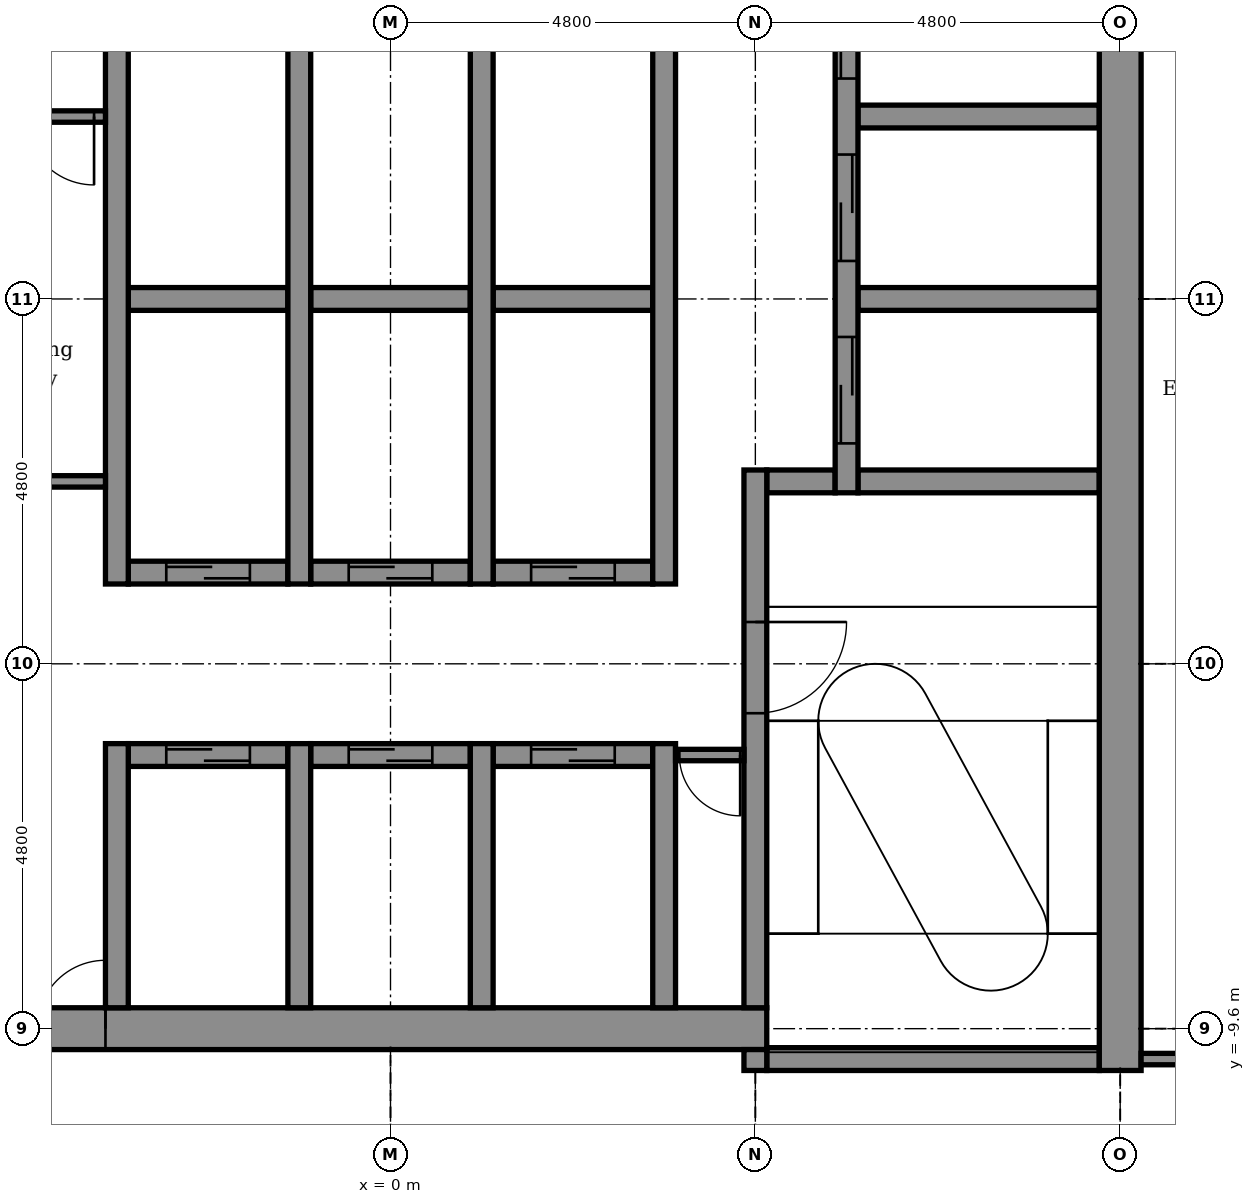
"""IFC4 building model, lengths in metres.
Left out: names, types, materials, properties, quantities, classifications, styles, units other than length and angle.
Written with IfcOpenShell. Run it as: python <this file> out.ifc"""

import sys

from ifc_helpers import new_model, si_unit, direction, frame, frame_2d, origin, place, context, subcontext, project, spatial, rectangle, extrude, element, fill, save


model = new_model("IFC4")
c1 = context("Model", 3, precision=1e-05, world=origin(), true_north=direction((0.0, 1.0)))
c2 = subcontext(c1, "Body", "Model", "MODEL_VIEW")
j1 = project(units=[si_unit("LENGTHUNIT", "METRE"), si_unit("PLANEANGLEUNIT", "RADIAN")], contexts=[c1])
p1 = place(None, origin())
s1 = spatial("IfcSite", under=j1, at=p1, CompositionType="ELEMENT")
p2 = place(p1, origin())
s2 = spatial("IfcBuilding", under=s1, at=p2, CompositionType="ELEMENT")
p3 = place(p2, frame((0.0, 0.0, 257.9)))
s3 = spatial("IfcBuildingStorey", under=s2, at=p3, CompositionType="ELEMENT", Elevation=257.9)
p4 = place(p3, frame((4.95, -10.0, -0.15), z_axis=(0.0, 0.0, 1.0), x_axis=(1.0, 0.0, 0.0)))
e1 = element("IfcWall", 1, at=p4, inside=s3, PredefinedType="STANDARD", context=c2, shape_type="SweptSolid", body=[
    extrude(rectangle(XDim=4.375, YDim=0.3, at=frame_2d((2.188, 0.0))), origin(), (0.0, 0.0, 1.0), 3.9),
])
p5 = place(p3, frame((-5.25, -9.6, -0.15), z_axis=(0.0, 0.0, 1.0), x_axis=(1.0, 0.0, 0.0)))
e2 = element("IfcWall", 2, at=p5, inside=s3, PredefinedType="SHEAR", context=c2, shape_type="SweptSolid", body=[
    extrude(rectangle(XDim=10.2, YDim=0.55, at=frame_2d((5.1, 0.0))), origin(), (0.0, 0.0, 1.0), 3.9),
])
p6 = place(p5, frame((0.6, 0.0, 0.15)))
e3 = element("IfcOpeningElement", 3, at=p6, cuts=e2, PredefinedType="OPENING", context=c2, shape_type="SweptSolid", body=[
    extrude(rectangle(XDim=0.9, YDim=2.1, at=frame_2d((0.45, 1.05))), frame((0.0, 0.285, 0.0), z_axis=(0.0, -1.0, 0.0), x_axis=(1.0, 0.0, 0.0)), (0.0, 0.0, 1.0), 0.57),
])
p7 = place(p3, frame((-3.45, -6.0, -0.15), z_axis=(0.0, 0.0, 1.0), x_axis=(1.0, 0.0, 0.0)))
e4 = element("IfcWall", 4, at=p7, inside=s3, PredefinedType="STANDARD", context=c2, shape_type="SweptSolid", body=[
    extrude(rectangle(XDim=2.1, YDim=0.3, at=frame_2d((1.05, 0.0))), origin(), (0.0, 0.0, 1.0), 3.9),
])
p8 = place(p7, frame((0.5, 0.0, 0.15)))
e5 = element("IfcOpeningElement", 5, at=p8, cuts=e4, PredefinedType="OPENING", context=c2, shape_type="SweptSolid", body=[
    extrude(rectangle(XDim=1.1, YDim=2.1, at=frame_2d((0.55, 1.05))), frame((0.0, 0.16, 0.0), z_axis=(0.0, -1.0, 0.0), x_axis=(1.0, 0.0, 0.0)), (0.0, 0.0, 1.0), 0.32),
])
p9 = place(p3, frame((-1.05, -6.0, -0.15), z_axis=(0.0, 0.0, 1.0), x_axis=(1.0, 0.0, 0.0)))
e6 = element("IfcWall", 6, at=p9, inside=s3, PredefinedType="STANDARD", context=c2, shape_type="SweptSolid", body=[
    extrude(rectangle(XDim=2.1, YDim=0.3, at=frame_2d((1.05, 0.0))), origin(), (0.0, 0.0, 1.0), 3.9),
])
p10 = place(p9, frame((0.5, 0.0, 0.15)))
e7 = element("IfcOpeningElement", 7, at=p10, cuts=e6, PredefinedType="OPENING", context=c2, shape_type="SweptSolid", body=[
    extrude(rectangle(XDim=1.1, YDim=2.1, at=frame_2d((0.55, 1.05))), frame((0.0, 0.16, 0.0), z_axis=(0.0, -1.0, 0.0), x_axis=(1.0, 0.0, 0.0)), (0.0, 0.0, 1.0), 0.32),
])
p11 = place(p3, frame((1.35, -6.0, -0.15), z_axis=(0.0, 0.0, 1.0), x_axis=(1.0, 0.0, 0.0)))
e8 = element("IfcWall", 8, at=p11, inside=s3, PredefinedType="STANDARD", context=c2, shape_type="SweptSolid", body=[
    extrude(rectangle(XDim=2.1, YDim=0.3, at=frame_2d((1.05, 0.0))), origin(), (0.0, 0.0, 1.0), 3.9),
])
p12 = place(p11, frame((0.5, 0.0, 0.15)))
e9 = element("IfcOpeningElement", 9, at=p12, cuts=e8, PredefinedType="OPENING", context=c2, shape_type="SweptSolid", body=[
    extrude(rectangle(XDim=1.1, YDim=2.1, at=frame_2d((0.55, 1.05))), frame((0.0, 0.16, 0.0), z_axis=(0.0, -1.0, 0.0), x_axis=(1.0, 0.0, 0.0)), (0.0, 0.0, 1.0), 0.32),
])
p13 = place(p3, frame((-3.45, -3.6, -0.15), z_axis=(0.0, 0.0, 1.0), x_axis=(1.0, 0.0, 0.0)))
e10 = element("IfcWall", 10, at=p13, inside=s3, PredefinedType="STANDARD", context=c2, shape_type="SweptSolid", body=[
    extrude(rectangle(XDim=2.1, YDim=0.3, at=frame_2d((1.05, 0.0))), origin(), (0.0, 0.0, 1.0), 3.9),
])
p14 = place(p13, frame((0.5, 0.0, 0.15)))
e11 = element("IfcOpeningElement", 11, at=p14, cuts=e10, PredefinedType="OPENING", context=c2, shape_type="SweptSolid", body=[
    extrude(rectangle(XDim=1.1, YDim=2.1, at=frame_2d((0.55, 1.05))), frame((0.0, 0.16, 0.0), z_axis=(0.0, -1.0, 0.0), x_axis=(1.0, 0.0, 0.0)), (0.0, 0.0, 1.0), 0.32),
])
p15 = place(p3, frame((-1.05, -3.6, -0.15), z_axis=(0.0, 0.0, 1.0), x_axis=(1.0, 0.0, 0.0)))
e12 = element("IfcWall", 12, at=p15, inside=s3, PredefinedType="STANDARD", context=c2, shape_type="SweptSolid", body=[
    extrude(rectangle(XDim=2.1, YDim=0.3, at=frame_2d((1.05, 0.0))), origin(), (0.0, 0.0, 1.0), 3.9),
])
p16 = place(p15, frame((0.5, 0.0, 0.15)))
e13 = element("IfcOpeningElement", 13, at=p16, cuts=e12, PredefinedType="OPENING", context=c2, shape_type="SweptSolid", body=[
    extrude(rectangle(XDim=1.1, YDim=2.1, at=frame_2d((0.55, 1.05))), frame((0.0, 0.16, 0.0), z_axis=(0.0, -1.0, 0.0), x_axis=(1.0, 0.0, 0.0)), (0.0, 0.0, 1.0), 0.32),
])
p17 = place(p3, frame((1.35, -3.6, -0.15), z_axis=(0.0, 0.0, 1.0), x_axis=(1.0, 0.0, 0.0)))
e14 = element("IfcWall", 14, at=p17, inside=s3, PredefinedType="STANDARD", context=c2, shape_type="SweptSolid", body=[
    extrude(rectangle(XDim=2.1, YDim=0.3, at=frame_2d((1.05, 0.0))), origin(), (0.0, 0.0, 1.0), 3.9),
])
p18 = place(p17, frame((0.5, 0.0, 0.15)))
e15 = element("IfcOpeningElement", 15, at=p18, cuts=e14, PredefinedType="OPENING", context=c2, shape_type="SweptSolid", body=[
    extrude(rectangle(XDim=1.1, YDim=2.1, at=frame_2d((0.55, 1.05))), frame((0.0, 0.16, 0.0), z_axis=(0.0, -1.0, 0.0), x_axis=(1.0, 0.0, 0.0)), (0.0, 0.0, 1.0), 0.32),
])
p19 = place(p3, frame((4.95, -2.4, -0.15), z_axis=(0.0, 0.0, 1.0), x_axis=(1.0, 0.0, 0.0)))
e16 = element("IfcWall", 16, at=p19, inside=s3, PredefinedType="STANDARD", context=c2, shape_type="SweptSolid", body=[
    extrude(rectangle(XDim=0.9, YDim=0.3, at=frame_2d((0.45, 0.0))), origin(), (0.0, 0.0, 1.0), 3.9),
])
p20 = place(p3, frame((6.15, -2.4, -0.15), z_axis=(0.0, 0.0, 1.0), x_axis=(1.0, 0.0, 0.0)))
e17 = element("IfcWall", 17, at=p20, inside=s3, PredefinedType="STANDARD", context=c2, shape_type="SweptSolid", body=[
    extrude(rectangle(XDim=3.175, YDim=0.3, at=frame_2d((1.587, 0.0))), origin(), (0.0, 0.0, 1.0), 3.9),
])
p21 = place(p3, frame((-3.45, 0.0, -0.15), z_axis=(0.0, 0.0, 1.0), x_axis=(1.0, 0.0, 0.0)))
e18 = element("IfcWall", 18, at=p21, inside=s3, PredefinedType="STANDARD", context=c2, shape_type="SweptSolid", body=[
    extrude(rectangle(XDim=2.1, YDim=0.3, at=frame_2d((1.05, 0.0))), origin(), (0.0, 0.0, 1.0), 3.9),
])
p22 = place(p3, frame((-1.05, 0.0, -0.15), z_axis=(0.0, 0.0, 1.0), x_axis=(1.0, 0.0, 0.0)))
e19 = element("IfcWall", 19, at=p22, inside=s3, PredefinedType="STANDARD", context=c2, shape_type="SweptSolid", body=[
    extrude(rectangle(XDim=2.1, YDim=0.3, at=frame_2d((1.05, 0.0))), origin(), (0.0, 0.0, 1.0), 3.9),
])
p23 = place(p3, frame((1.35, 0.0, -0.15), z_axis=(0.0, 0.0, 1.0), x_axis=(1.0, 0.0, 0.0)))
e20 = element("IfcWall", 20, at=p23, inside=s3, PredefinedType="STANDARD", context=c2, shape_type="SweptSolid", body=[
    extrude(rectangle(XDim=2.1, YDim=0.3, at=frame_2d((1.05, 0.0))), origin(), (0.0, 0.0, 1.0), 3.9),
])
for number, where, z_axis, x_axis in (
    (21, (6.15, 0.0, -0.15), (0.0, 0.0, 1.0), (1.0, 0.0, 0.0)),
    (22, (6.15, 2.4, -0.15), (0.0, 0.0, 1.0), (1.0, 0.0, 0.0)),
):
    element("IfcWall", number, at=place(p3, frame(where, z_axis=z_axis, x_axis=x_axis)), inside=s3, PredefinedType="STANDARD", context=c2, shape_type="SweptSolid", body=[
        extrude(rectangle(XDim=3.175, YDim=0.3, at=frame_2d((1.587, 0.0))), origin(), (0.0, 0.0, 1.0), 3.9),
    ])
p24 = place(p3, frame((-3.6, -9.325, -0.15), z_axis=(0.0, 0.0, 1.0), x_axis=(0.0, 1.0, 0.0)))
e23 = element("IfcWall", 23, at=p24, inside=s3, PredefinedType="STANDARD", context=c2, shape_type="SweptSolid", body=[
    extrude(rectangle(XDim=3.475, YDim=0.3, at=frame_2d((1.737, 0.0))), origin(), (0.0, 0.0, 1.0), 3.9),
])
p25 = place(p3, frame((-3.6, -3.75, -0.15), z_axis=(0.0, 0.0, 1.0), x_axis=(0.0, 1.0, 0.0)))
e24 = element("IfcWall", 24, at=p25, inside=s3, PredefinedType="STANDARD", context=c2, shape_type="SweptSolid", body=[
    extrude(rectangle(XDim=7.5, YDim=0.3, at=frame_2d((3.75, 0.0))), origin(), (0.0, 0.0, 1.0), 3.9),
])
p26 = place(p3, frame((-1.2, -9.325, -0.15), z_axis=(0.0, 0.0, 1.0), x_axis=(0.0, 1.0, 0.0)))
e25 = element("IfcWall", 25, at=p26, inside=s3, PredefinedType="STANDARD", context=c2, shape_type="SweptSolid", body=[
    extrude(rectangle(XDim=3.475, YDim=0.3, at=frame_2d((1.737, 0.0))), origin(), (0.0, 0.0, 1.0), 3.9),
])
p27 = place(p3, frame((-1.2, -3.75, -0.15), z_axis=(0.0, 0.0, 1.0), x_axis=(0.0, 1.0, 0.0)))
e26 = element("IfcWall", 26, at=p27, inside=s3, PredefinedType="STANDARD", context=c2, shape_type="SweptSolid", body=[
    extrude(rectangle(XDim=7.5, YDim=0.3, at=frame_2d((3.75, 0.0))), origin(), (0.0, 0.0, 1.0), 3.9),
])
p28 = place(p3, frame((1.2, -9.325, -0.15), z_axis=(0.0, 0.0, 1.0), x_axis=(0.0, 1.0, 0.0)))
e27 = element("IfcWall", 27, at=p28, inside=s3, PredefinedType="STANDARD", context=c2, shape_type="SweptSolid", body=[
    extrude(rectangle(XDim=3.475, YDim=0.3, at=frame_2d((1.737, 0.0))), origin(), (0.0, 0.0, 1.0), 3.9),
])
p29 = place(p3, frame((1.2, -3.75, -0.15), z_axis=(0.0, 0.0, 1.0), x_axis=(0.0, 1.0, 0.0)))
e28 = element("IfcWall", 28, at=p29, inside=s3, PredefinedType="STANDARD", context=c2, shape_type="SweptSolid", body=[
    extrude(rectangle(XDim=7.5, YDim=0.3, at=frame_2d((3.75, 0.0))), origin(), (0.0, 0.0, 1.0), 3.9),
])
p30 = place(p3, frame((3.6, -9.325, -0.15), z_axis=(0.0, 0.0, 1.0), x_axis=(0.0, 1.0, 0.0)))
e29 = element("IfcWall", 29, at=p30, inside=s3, PredefinedType="STANDARD", context=c2, shape_type="SweptSolid", body=[
    extrude(rectangle(XDim=3.475, YDim=0.3, at=frame_2d((1.737, 0.0))), origin(), (0.0, 0.0, 1.0), 3.9),
])
p31 = place(p3, frame((3.6, -3.75, -0.15), z_axis=(0.0, 0.0, 1.0), x_axis=(0.0, 1.0, 0.0)))
e30 = element("IfcWall", 30, at=p31, inside=s3, PredefinedType="STANDARD", context=c2, shape_type="SweptSolid", body=[
    extrude(rectangle(XDim=7.5, YDim=0.3, at=frame_2d((3.75, 0.0))), origin(), (0.0, 0.0, 1.0), 3.9),
])
p32 = place(p3, frame((4.8, -10.15, -0.15), z_axis=(0.0, 0.0, 1.0), x_axis=(0.0, 1.0, 0.0)))
e31 = element("IfcWall", 31, at=p32, inside=s3, PredefinedType="STANDARD", context=c2, shape_type="SweptSolid", body=[
    extrude(rectangle(XDim=0.275, YDim=0.3, at=frame_2d((0.137, 0.0))), origin(), (0.0, 0.0, 1.0), 3.9),
])
p33 = place(p3, frame((4.8, -9.325, -0.15), z_axis=(0.0, 0.0, 1.0), x_axis=(0.0, 1.0, 0.0)))
e32 = element("IfcWall", 32, at=p33, inside=s3, PredefinedType="STANDARD", context=c2, shape_type="SweptSolid", body=[
    extrude(rectangle(XDim=7.075, YDim=0.3, at=frame_2d((3.538, 0.0))), origin(), (0.0, 0.0, 1.0), 3.9),
])
p34 = place(p33, frame((3.875, 0.0, 0.15)))
e33 = element("IfcOpeningElement", 33, at=p34, cuts=e32, PredefinedType="OPENING", context=c2, shape_type="SweptSolid", body=[
    extrude(rectangle(XDim=1.2, YDim=2.1, at=frame_2d((0.6, 1.05))), frame((0.0, 0.16, 0.0), z_axis=(0.0, -1.0, 0.0), x_axis=(1.0, 0.0, 0.0)), (0.0, 0.0, 1.0), 0.32),
])
p35 = place(p3, frame((6.0, -2.55, -0.15), z_axis=(0.0, 0.0, 1.0), x_axis=(0.0, 1.0, 0.0)))
e34 = element("IfcWall", 34, at=p35, inside=s3, PredefinedType="STANDARD", context=c2, shape_type="SweptSolid", body=[
    extrude(rectangle(XDim=7.5, YDim=0.3, at=frame_2d((3.75, 0.0))), origin(), (0.0, 0.0, 1.0), 3.9),
])
p36 = place(p35, frame((0.65, 0.0, 0.15)))
e35 = element("IfcOpeningElement", 35, at=p36, cuts=e34, PredefinedType="OPENING", context=c2, shape_type="SweptSolid", body=[
    extrude(rectangle(XDim=1.4, YDim=2.1, at=frame_2d((0.7, 1.05))), frame((0.0, 0.16, 0.0), z_axis=(0.0, -1.0, 0.0), x_axis=(1.0, 0.0, 0.0)), (0.0, 0.0, 1.0), 0.32),
])
p37 = place(p35, frame((3.05, 0.0, 0.15)))
e36 = element("IfcOpeningElement", 36, at=p37, cuts=e34, PredefinedType="OPENING", context=c2, shape_type="SweptSolid", body=[
    extrude(rectangle(XDim=1.4, YDim=2.1, at=frame_2d((0.7, 1.05))), frame((0.0, 0.16, 0.0), z_axis=(0.0, -1.0, 0.0), x_axis=(1.0, 0.0, 0.0)), (0.0, 0.0, 1.0), 0.32),
])
p38 = place(p35, frame((5.45, 0.0, 0.15)))
e37 = element("IfcOpeningElement", 37, at=p38, cuts=e34, PredefinedType="OPENING", context=c2, shape_type="SweptSolid", body=[
    extrude(rectangle(XDim=1.4, YDim=2.1, at=frame_2d((0.7, 1.05))), frame((0.0, 0.16, 0.0), z_axis=(0.0, -1.0, 0.0), x_axis=(1.0, 0.0, 0.0)), (0.0, 0.0, 1.0), 0.32),
])
p39 = place(p3, frame((9.6, -10.15, -0.15), z_axis=(0.0, 0.0, 1.0), x_axis=(0.0, 1.0, 0.0)))
e38 = element("IfcWall", 38, at=p39, inside=s3, PredefinedType="SHEAR", context=c2, shape_type="SweptSolid", body=[
    extrude(rectangle(XDim=20.075, YDim=0.55, at=frame_2d((10.038, 0.0))), origin(), (0.0, 0.0, 1.0), 3.9),
])
p40 = place(p3, frame((9.875, -10.0, 0.0), z_axis=(0.0, 0.0, 1.0), x_axis=(1.0, 0.0, 0.0)))
e39 = element("IfcWall", 39, at=p40, inside=s3, PredefinedType="PARTITIONING", context=c2, shape_type="SweptSolid", body=[
    extrude(rectangle(XDim=4.68, YDim=0.15, at=frame_2d((2.34, 0.0))), origin(), (0.0, 0.0, 1.0), 3.75),
])
p41 = place(p3, frame((3.75, -6.0, 0.0), z_axis=(0.0, 0.0, 1.0), x_axis=(1.0, 0.0, 0.0)))
e40 = element("IfcWall", 40, at=p41, inside=s3, PredefinedType="PARTITIONING", context=c2, shape_type="SweptSolid", body=[
    extrude(rectangle(XDim=0.9, YDim=0.15, at=frame_2d((0.45, 0.0))), origin(), (0.0, 0.0, 1.0), 3.75),
])
p42 = place(p41, frame((0.05, 0.0, 0.0)))
e41 = element("IfcOpeningElement", 41, at=p42, cuts=e40, PredefinedType="OPENING", context=c2, shape_type="SweptSolid", body=[
    extrude(rectangle(XDim=0.8, YDim=2.1, at=frame_2d((0.4, 1.05))), frame((0.0, 0.085, 0.0), z_axis=(0.0, -1.0, 0.0), x_axis=(1.0, 0.0, 0.0)), (0.0, 0.0, 1.0), 0.17),
])
p43 = place(p3, frame((-4.95, 2.4, 0.0), z_axis=(0.0, 0.0, 1.0), x_axis=(1.0, 0.0, 0.0)))
e42 = element("IfcWall", 42, at=p43, inside=s3, PredefinedType="PARTITIONING", context=c2, shape_type="SweptSolid", body=[
    extrude(rectangle(XDim=1.2, YDim=0.15, at=frame_2d((0.6, 0.0))), origin(), (0.0, 0.0, 1.0), 3.75),
])
p44 = place(p43, frame((0.15, 0.0, 0.0)))
e43 = element("IfcOpeningElement", 43, at=p44, cuts=e42, PredefinedType="OPENING", context=c2, shape_type="SweptSolid", body=[
    extrude(rectangle(XDim=0.9, YDim=2.1, at=frame_2d((0.45, 1.05))), frame((0.0, 0.085, 0.0), z_axis=(0.0, -1.0, 0.0), x_axis=(1.0, 0.0, 0.0)), (0.0, 0.0, 1.0), 0.17),
])
p45 = place(p3, frame((-4.95, -2.4, 0.0), z_axis=(0.0, 0.0, 1.0), x_axis=(1.0, 0.0, 0.0)))
e44 = element("IfcWall", 44, at=p45, inside=s3, PredefinedType="PARTITIONING", context=c2, shape_type="SweptSolid", body=[
    extrude(rectangle(XDim=1.2, YDim=0.15, at=frame_2d((0.6, 0.0))), origin(), (0.0, 0.0, 1.0), 3.75),
])
p46 = place(p42, frame((0.8, 0.0, 0.0), z_axis=(0.0, 0.0, 1.0), x_axis=(-1.0, 0.0, 0.0)))
e45 = element("IfcDoor", 45, at=p46, inside=s3, OperationType="SINGLE_SWING_RIGHT", PredefinedType="DOOR", context=c2, shape_type="SweptSolid", body=[
    extrude(rectangle(XDim=0.8, YDim=2.1, at=frame_2d((0.4, 1.05))), frame((0.0, 0.025, 0.0), z_axis=(0.0, -1.0, 0.0), x_axis=(1.0, 0.0, 0.0)), (0.0, 0.0, 1.0), 0.05),
])
fill(e41, e45)
p47 = place(p36, origin())
e46 = element("IfcDoor", 46, at=p47, inside=s3, OperationType="DOUBLE_DOOR_SLIDING", PredefinedType="DOOR", context=c2, shape_type="SweptSolid", body=[
    extrude(rectangle(XDim=1.4, YDim=2.1, at=frame_2d((0.7, 1.05))), frame((0.0, 0.025, 0.0), z_axis=(0.0, -1.0, 0.0), x_axis=(1.0, 0.0, 0.0)), (0.0, 0.0, 1.0), 0.05),
])
fill(e35, e46)
p48 = place(p37, origin())
e47 = element("IfcDoor", 47, at=p48, inside=s3, OperationType="DOUBLE_DOOR_SLIDING", PredefinedType="DOOR", context=c2, shape_type="SweptSolid", body=[
    extrude(rectangle(XDim=1.4, YDim=2.1, at=frame_2d((0.7, 1.05))), frame((0.0, 0.025, 0.0), z_axis=(0.0, -1.0, 0.0), x_axis=(1.0, 0.0, 0.0)), (0.0, 0.0, 1.0), 0.05),
])
fill(e36, e47)
p49 = place(p38, origin())
e48 = element("IfcDoor", 48, at=p49, inside=s3, OperationType="DOUBLE_DOOR_SLIDING", PredefinedType="DOOR", context=c2, shape_type="SweptSolid", body=[
    extrude(rectangle(XDim=1.4, YDim=2.1, at=frame_2d((0.7, 1.05))), frame((0.0, 0.025, 0.0), z_axis=(0.0, -1.0, 0.0), x_axis=(1.0, 0.0, 0.0)), (0.0, 0.0, 1.0), 0.05),
])
fill(e37, e48)
p50 = place(p14, origin())
e49 = element("IfcDoor", 49, at=p50, inside=s3, OperationType="DOUBLE_DOOR_SLIDING", PredefinedType="DOOR", context=c2, shape_type="SweptSolid", body=[
    extrude(rectangle(XDim=1.1, YDim=2.1, at=frame_2d((0.55, 1.05))), frame((0.0, 0.025, 0.0), z_axis=(0.0, -1.0, 0.0), x_axis=(1.0, 0.0, 0.0)), (0.0, 0.0, 1.0), 0.05),
])
fill(e11, e49)
p51 = place(p16, origin())
e50 = element("IfcDoor", 50, at=p51, inside=s3, OperationType="DOUBLE_DOOR_SLIDING", PredefinedType="DOOR", context=c2, shape_type="SweptSolid", body=[
    extrude(rectangle(XDim=1.1, YDim=2.1, at=frame_2d((0.55, 1.05))), frame((0.0, 0.025, 0.0), z_axis=(0.0, -1.0, 0.0), x_axis=(1.0, 0.0, 0.0)), (0.0, 0.0, 1.0), 0.05),
])
fill(e13, e50)
p52 = place(p18, origin())
e51 = element("IfcDoor", 51, at=p52, inside=s3, OperationType="DOUBLE_DOOR_SLIDING", PredefinedType="DOOR", context=c2, shape_type="SweptSolid", body=[
    extrude(rectangle(XDim=1.1, YDim=2.1, at=frame_2d((0.55, 1.05))), frame((0.0, 0.025, 0.0), z_axis=(0.0, -1.0, 0.0), x_axis=(1.0, 0.0, 0.0)), (0.0, 0.0, 1.0), 0.05),
])
fill(e15, e51)
p53 = place(p8, origin())
e52 = element("IfcDoor", 52, at=p53, inside=s3, OperationType="DOUBLE_DOOR_SLIDING", PredefinedType="DOOR", context=c2, shape_type="SweptSolid", body=[
    extrude(rectangle(XDim=1.1, YDim=2.1, at=frame_2d((0.55, 1.05))), frame((0.0, 0.025, 0.0), z_axis=(0.0, -1.0, 0.0), x_axis=(1.0, 0.0, 0.0)), (0.0, 0.0, 1.0), 0.05),
])
fill(e5, e52)
p54 = place(p10, origin())
e53 = element("IfcDoor", 53, at=p54, inside=s3, OperationType="DOUBLE_DOOR_SLIDING", PredefinedType="DOOR", context=c2, shape_type="SweptSolid", body=[
    extrude(rectangle(XDim=1.1, YDim=2.1, at=frame_2d((0.55, 1.05))), frame((0.0, 0.025, 0.0), z_axis=(0.0, -1.0, 0.0), x_axis=(1.0, 0.0, 0.0)), (0.0, 0.0, 1.0), 0.05),
])
fill(e7, e53)
p55 = place(p12, origin())
e54 = element("IfcDoor", 54, at=p55, inside=s3, OperationType="DOUBLE_DOOR_SLIDING", PredefinedType="DOOR", context=c2, shape_type="SweptSolid", body=[
    extrude(rectangle(XDim=1.1, YDim=2.1, at=frame_2d((0.55, 1.05))), frame((0.0, 0.025, 0.0), z_axis=(0.0, -1.0, 0.0), x_axis=(1.0, 0.0, 0.0)), (0.0, 0.0, 1.0), 0.05),
])
fill(e9, e54)
p56 = place(p34, frame((1.2, 0.0, 0.0), z_axis=(0.0, 0.0, 1.0), x_axis=(-1.0, 0.0, 0.0)))
e55 = element("IfcDoor", 55, at=p56, inside=s3, OperationType="SINGLE_SWING_RIGHT", PredefinedType="DOOR", context=c2, shape_type="SweptSolid", body=[
    extrude(rectangle(XDim=1.2, YDim=2.1, at=frame_2d((0.6, 1.05))), frame((0.0, 0.025, 0.0), z_axis=(0.0, -1.0, 0.0), x_axis=(1.0, 0.0, 0.0)), (0.0, 0.0, 1.0), 0.05),
])
fill(e33, e55)
p57 = place(p6, origin())
e56 = element("IfcDoor", 56, at=p57, inside=s3, OperationType="SINGLE_SWING_RIGHT", PredefinedType="DOOR", context=c2, shape_type="SweptSolid", body=[
    extrude(rectangle(XDim=0.9, YDim=2.1, at=frame_2d((0.45, 1.05))), frame((0.0, 0.025, 0.0), z_axis=(0.0, -1.0, 0.0), x_axis=(1.0, 0.0, 0.0)), (0.0, 0.0, 1.0), 0.05),
])
fill(e3, e56)
p58 = place(p44, frame((0.9, 0.0, 0.0), z_axis=(0.0, 0.0, 1.0), x_axis=(-1.0, 0.0, 0.0)))
e57 = element("IfcDoor", 57, at=p58, inside=s3, OperationType="SINGLE_SWING_RIGHT", PredefinedType="DOOR", context=c2, shape_type="SweptSolid", body=[
    extrude(rectangle(XDim=0.9, YDim=2.1, at=frame_2d((0.45, 1.05))), frame((0.0, 0.025, 0.0), z_axis=(0.0, -1.0, 0.0), x_axis=(1.0, 0.0, 0.0)), (0.0, 0.0, 1.0), 0.05),
])
fill(e43, e57)
save(model, sys.argv[1])
